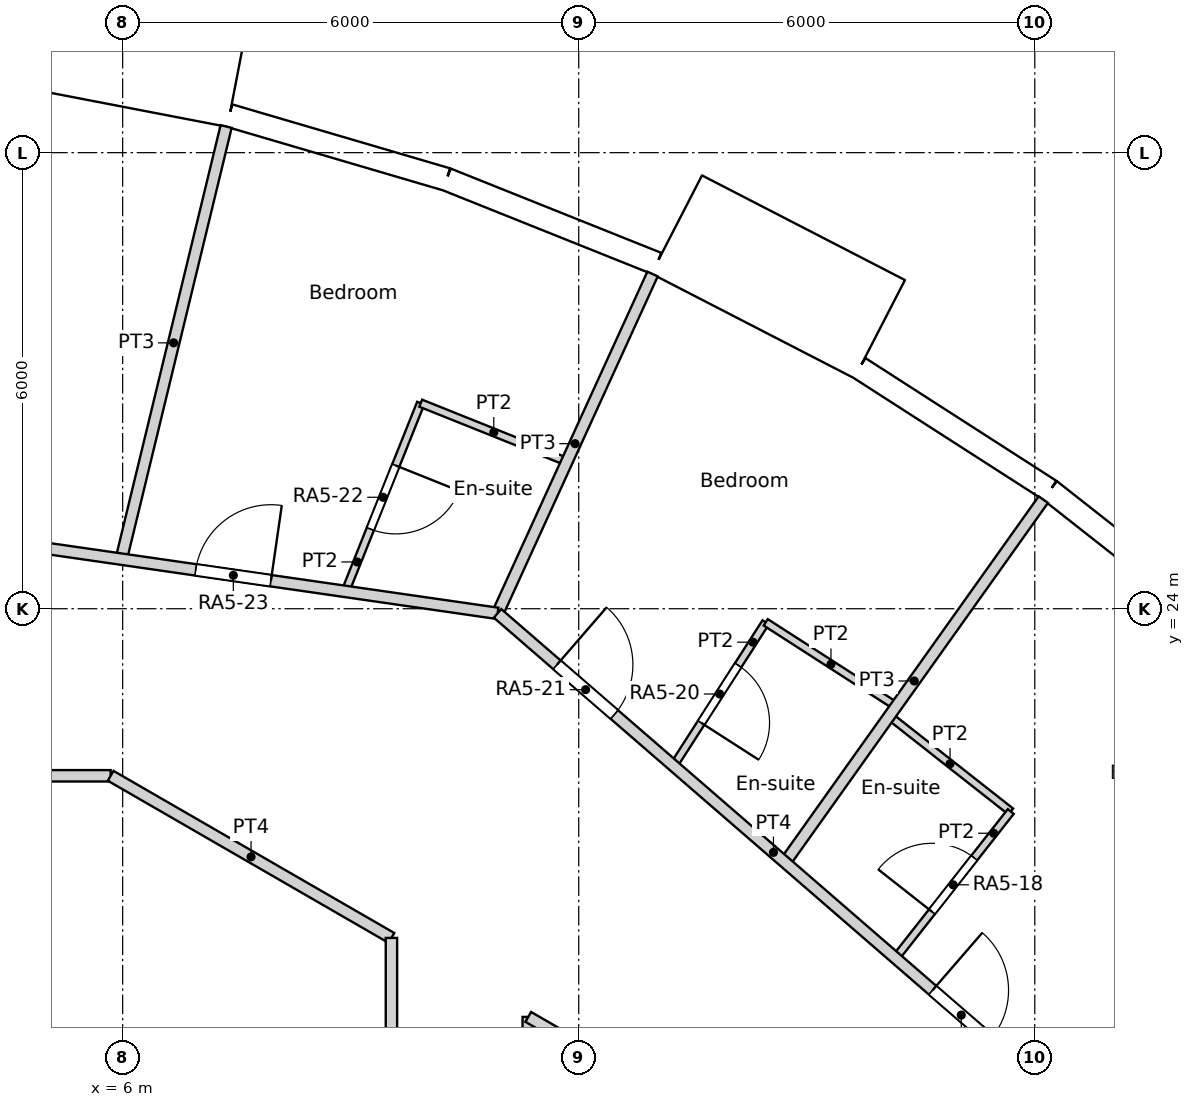
"""IFC4 building model, lengths in metres.
Left out: names, types, materials, properties, quantities, classifications, styles, units other than length and angle.
Written with IfcOpenShell. Run it as: python <this file> out.ifc"""

import sys

from ifc_helpers import new_model, si_unit, direction, frame, frame_2d, origin, origin_2d, place, context, subcontext, project, spatial, rectangle, circle, extrude, element, fill, save


model = new_model("IFC4")
c1 = context("Model", 3, precision=1e-05, world=origin(), true_north=direction((0.0, 1.0)))
c2 = subcontext(c1, "Body", "Model", "MODEL_VIEW")
j1 = project(units=[si_unit("LENGTHUNIT", "METRE"), si_unit("PLANEANGLEUNIT", "RADIAN")], contexts=[c1])
p1 = place(None, origin())
s1 = spatial("IfcSite", under=j1, at=p1, CompositionType="ELEMENT")
p2 = place(p1, origin())
s2 = spatial("IfcBuilding", under=s1, at=p2, CompositionType="ELEMENT")
p3 = place(p2, frame((0.0, 0.0, 71.4)))
s3 = spatial("IfcBuildingStorey", under=s2, at=p3, CompositionType="ELEMENT", Elevation=71.4)
for number, where, z_axis, x_axis in (
    (1, (17.561, 24.661, 0.0), (0.0, 0.0, 1.0), (1.0, 0.0, 0.0)),
    (2, (12.576, 27.539, 0.0), (0.0, 0.0, 1.0), (1.0, 0.0, 0.0)),
    (3, (7.137, 29.421, 0.0), (0.0, 0.0, 1.0), (1.0, 0.0, 0.0)),
):
    element("IfcColumn", number, at=place(p3, frame(where, z_axis=z_axis, x_axis=x_axis)), inside=s3, PredefinedType="COLUMN", context=c2, shape_type="SweptSolid", body=[
        extrude(circle(Radius=0.6, at=origin_2d()), origin(), (0.0, 0.0, 1.0), 3.6),
    ])
for number, where, z_axis, x_axis in (
    (4, (14.659, 19.69, 0.0), (0.0, 0.0, 1.0), (1.0, 0.0, 0.0)),
    (5, (9.723, 22.54, 0.0), (0.0, 0.0, 1.0), (1.0, 0.0, 0.0)),
):
    element("IfcColumn", number, at=place(p3, frame(where, z_axis=z_axis, x_axis=x_axis)), inside=s3, PredefinedType="COLUMN", context=c2, shape_type="SweptSolid", body=[
        extrude(circle(Radius=0.65, at=origin_2d()), origin(), (0.0, 0.0, 1.0), 3.6),
    ])
p4 = place(p3, frame((20.541, 23.715, 0.0), z_axis=(0.0, 0.0, 1.0), x_axis=(-0.786053834673, 0.618158045322, 0.0)))
e6 = element("IfcWall", 6, at=p4, inside=s3, PredefinedType="SOLIDWALL", context=c2, shape_type="SweptSolid", body=[
    extrude(rectangle(XDim=2.979, YDim=0.3, at=frame_2d((1.49, 0.0))), origin(), (0.0, 0.0, 1.0), 3.15),
])
p5 = place(p4, frame((1.49, 0.0, 1.55)))
e7 = element("IfcOpeningElement", 7, at=p5, cuts=e6, PredefinedType="OPENING", context=c2, shape_type="SweptSolid", body=[
    extrude(circle(Radius=0.9, at=origin_2d()), frame((0.0, 0.16, 0.0), z_axis=(0.0, -1.0, 0.0), x_axis=(1.0, 0.0, 0.0)), (0.0, 0.0, 1.0), 0.32),
])
p6 = place(p3, frame((18.199, 25.557, 0.0), z_axis=(0.0, 0.0, 1.0), x_axis=(-0.841260995538, 0.54062920508, 0.0)))
e8 = element("IfcWall", 8, at=p6, inside=s3, PredefinedType="SOLIDWALL", context=c2, shape_type="SweptSolid", body=[
    extrude(rectangle(XDim=2.979, YDim=0.3, at=frame_2d((1.49, 0.0))), origin(), (0.0, 0.0, 1.0), 3.15),
])
p7 = place(p6, frame((1.49, 0.0, 1.55)))
e9 = element("IfcOpeningElement", 9, at=p7, cuts=e8, PredefinedType="OPENING", context=c2, shape_type="SweptSolid", body=[
    extrude(circle(Radius=0.9, at=origin_2d()), frame((0.0, 0.16, 0.0), z_axis=(0.0, -1.0, 0.0), x_axis=(1.0, 0.0, 0.0)), (0.0, 0.0, 1.0), 0.32),
])
p8 = place(p3, frame((15.957, 27.679, -0.45), z_axis=(0.0, 0.0, 1.0), x_axis=(-0.888858064689, 0.458182650083, 0.0)))
e10 = element("IfcWall", 10, at=p8, inside=s3, PredefinedType="ELEMENTEDWALL", context=c2, shape_type="SweptSolid", body=[
    extrude(rectangle(XDim=3.0, YDim=1.45, at=frame_2d((1.5, 0.0))), origin(), (0.0, 0.0, 1.0), 3.6),
])
p9 = place(p8, frame((1.5, 0.0, 2.0)))
e11 = element("IfcOpeningElement", 11, at=p9, cuts=e10, PredefinedType="OPENING", context=c2, shape_type="SweptSolid", body=[
    extrude(circle(Radius=0.9, at=origin_2d()), frame((0.0, 0.735, 0.0), z_axis=(0.0, -1.0, 0.0), x_axis=(1.0, 0.0, 0.0)), (0.0, 0.0, 1.0), 1.47),
])
p10 = place(p3, frame((13.028, 28.542, 0.0), z_axis=(0.0, 0.0, 1.0), x_axis=(-0.928374947, 0.371644935098, 0.0)))
e12 = element("IfcWall", 12, at=p10, inside=s3, PredefinedType="SOLIDWALL", context=c2, shape_type="SweptSolid", body=[
    extrude(rectangle(XDim=2.98, YDim=0.3, at=frame_2d((1.49, 0.0))), origin(), (0.0, 0.0, 1.0), 3.15),
])
p11 = place(p10, frame((1.49, 0.0, 1.55)))
e13 = element("IfcOpeningElement", 13, at=p11, cuts=e12, PredefinedType="OPENING", context=c2, shape_type="SweptSolid", body=[
    extrude(circle(Radius=0.9, at=origin_2d()), frame((0.0, 0.16, 0.0), z_axis=(0.0, -1.0, 0.0), x_axis=(1.0, 0.0, 0.0)), (0.0, 0.0, 1.0), 0.32),
])
p12 = place(p3, frame((10.261, 29.649, 0.0), z_axis=(0.0, 0.0, 1.0), x_axis=(-0.959501085144, 0.281704930036, 0.0)))
e14 = element("IfcWall", 14, at=p12, inside=s3, PredefinedType="SOLIDWALL", context=c2, shape_type="SweptSolid", body=[
    extrude(rectangle(XDim=2.979, YDim=0.3, at=frame_2d((1.49, 0.0))), origin(), (0.0, 0.0, 1.0), 3.15),
])
p13 = place(p12, frame((1.49, 0.0, 1.55)))
e15 = element("IfcOpeningElement", 15, at=p13, cuts=e14, PredefinedType="OPENING", context=c2, shape_type="SweptSolid", body=[
    extrude(circle(Radius=0.9, at=origin_2d()), frame((0.0, 0.16, 0.0), z_axis=(0.0, -1.0, 0.0), x_axis=(1.0, 0.0, 0.0)), (0.0, 0.0, 1.0), 0.32),
])
p14 = place(p3, frame((7.513, 31.053, -0.45), z_axis=(0.0, 0.0, 1.0), x_axis=(-0.981921602273, 0.189288052949, 0.0)))
e16 = element("IfcWall", 16, at=p14, inside=s3, PredefinedType="ELEMENTEDWALL", context=c2, shape_type="SweptSolid", body=[
    extrude(rectangle(XDim=3.0, YDim=1.45, at=frame_2d((1.5, 0.0))), origin(), (0.0, 0.0, 1.0), 3.6),
])
p15 = place(p14, frame((1.5, 0.0, 2.0)))
e17 = element("IfcOpeningElement", 17, at=p15, cuts=e16, PredefinedType="OPENING", context=c2, shape_type="SweptSolid", body=[
    extrude(circle(Radius=0.9, at=origin_2d()), frame((0.0, 0.735, 0.0), z_axis=(0.0, -1.0, 0.0), x_axis=(1.0, 0.0, 0.0)), (0.0, 0.0, 1.0), 1.47),
])
p16 = place(p3, frame((10.932, 23.939, 0.0), z_axis=(0.0, 0.0, 1.0), x_axis=(0.755838982892, -0.654757536757, 0.0)))
e18 = element("IfcWall", 18, at=p16, inside=s3, PredefinedType="PARTITIONING", context=c2, shape_type="SweptSolid", body=[
    extrude(rectangle(XDim=14.83, YDim=0.15, at=frame_2d((7.415, 0.0))), origin(), (0.0, 0.0, 1.0), 3.15),
])
p17 = place(p16, frame((12.796, 0.0, 0.0)))
e19 = element("IfcOpeningElement", 19, at=p17, cuts=e18, PredefinedType="OPENING", context=c2, shape_type="SweptSolid", body=[
    extrude(rectangle(XDim=1.0, YDim=2.1, at=frame_2d((0.5, 1.05))), frame((0.0, 0.075, 0.0), z_axis=(0.0, -1.0, 0.0), x_axis=(1.0, 0.0, 0.0)), (0.0, 0.0, 1.0), 0.15),
])
p18 = place(p16, frame((7.572, 0.0, 0.0)))
e20 = element("IfcOpeningElement", 20, at=p18, cuts=e18, PredefinedType="OPENING", context=c2, shape_type="SweptSolid", body=[
    extrude(rectangle(XDim=1.0, YDim=2.1, at=frame_2d((0.5, 1.05))), frame((0.0, 0.075, 0.0), z_axis=(0.0, -1.0, 0.0), x_axis=(1.0, 0.0, 0.0)), (0.0, 0.0, 1.0), 0.15),
])
p19 = place(p16, frame((1.033, 0.0, 0.0)))
e21 = element("IfcOpeningElement", 21, at=p19, cuts=e18, PredefinedType="OPENING", context=c2, shape_type="SweptSolid", body=[
    extrude(rectangle(XDim=1.0, YDim=2.1, at=frame_2d((0.5, 1.05))), frame((0.0, 0.075, 0.0), z_axis=(0.0, -1.0, 0.0), x_axis=(1.0, 0.0, 0.0)), (0.0, 0.0, 1.0), 0.15),
])
p20 = place(p3, frame((9.536, 11.8, 0.0), z_axis=(0.0, 0.0, 1.0), x_axis=(0.0, 1.0, 0.0)))
e22 = element("IfcWall", 22, at=p20, inside=s3, PredefinedType="PARTITIONING", context=c2, shape_type="SweptSolid", body=[
    extrude(rectangle(XDim=7.869, YDim=0.15, at=frame_2d((3.935, 0.0))), origin(), (0.0, 0.0, 1.0), 3.15),
])
p21 = place(p3, frame((5.842, 21.802, 0.0), z_axis=(0.0, 0.0, 1.0), x_axis=(0.865983505205, -0.500072563448, 0.0)))
e23 = element("IfcWall", 23, at=p21, inside=s3, PredefinedType="PARTITIONING", context=c2, shape_type="SweptSolid", body=[
    extrude(rectangle(XDim=4.265, YDim=0.15, at=frame_2d((2.133, 0.0))), origin(), (0.0, 0.0, 1.0), 3.15),
])
p22 = place(p3, frame((0.608, 21.802, 0.0), z_axis=(0.0, 0.0, 1.0), x_axis=(1.0, 0.0, 0.0)))
e24 = element("IfcWall", 24, at=p22, inside=s3, PredefinedType="PARTITIONING", context=c2, shape_type="SweptSolid", body=[
    extrude(rectangle(XDim=5.234, YDim=0.15, at=frame_2d((2.617, 0.0))), origin(), (0.0, 0.0, 1.0), 3.15),
])
p23 = place(p3, frame((11.336, 18.63, 0.0), z_axis=(0.0, 0.0, 1.0), x_axis=(0.866056911224, -0.499945423543, 0.0)))
e25 = element("IfcWall", 25, at=p23, inside=s3, PredefinedType="PARTITIONING", context=c2, shape_type="SweptSolid", body=[
    extrude(rectangle(XDim=5.339, YDim=0.15, at=frame_2d((2.67, 0.0))), origin(), (0.0, 0.0, 1.0), 3.15),
])
p24 = place(p3, frame((11.336, 11.8, 0.0), z_axis=(0.0, 0.0, 1.0), x_axis=(0.0, 1.0, 0.0)))
e26 = element("IfcWall", 26, at=p24, inside=s3, PredefinedType="PARTITIONING", context=c2, shape_type="SweptSolid", body=[
    extrude(rectangle(XDim=6.83, YDim=0.15, at=frame_2d((3.415, 0.0))), origin(), (0.0, 0.0, 1.0), 3.15),
])
p25 = place(p24, frame((4.24, 0.0, 0.0)))
e27 = element("IfcOpeningElement", 27, at=p25, cuts=e26, PredefinedType="OPENING", context=c2, shape_type="SweptSolid", body=[
    extrude(rectangle(XDim=0.95, YDim=2.1, at=frame_2d((0.475, 1.05))), frame((0.0, 0.075, 0.0), z_axis=(0.0, -1.0, 0.0), x_axis=(1.0, 0.0, 0.0)), (0.0, 0.0, 1.0), 0.15),
])
p26 = place(p3, frame((-3.746, 26.054, 0.0), z_axis=(0.0, 0.0, 1.0), x_axis=(0.989780545379, -0.142598990138, 0.0)))
e28 = element("IfcWall", 28, at=p26, inside=s3, PredefinedType="PARTITIONING", context=c2, shape_type="SweptSolid", body=[
    extrude(rectangle(XDim=14.83, YDim=0.15, at=frame_2d((7.415, 0.0))), origin(), (0.0, 0.0, 1.0), 3.15),
])
p27 = place(p26, frame((10.817, 0.0, 0.0)))
e29 = element("IfcOpeningElement", 29, at=p27, cuts=e28, PredefinedType="OPENING", context=c2, shape_type="SweptSolid", body=[
    extrude(rectangle(XDim=1.0, YDim=2.1, at=frame_2d((0.5, 1.05))), frame((0.0, 0.075, 0.0), z_axis=(0.0, -1.0, 0.0), x_axis=(1.0, 0.0, 0.0)), (0.0, 0.0, 1.0), 0.15),
])
p28 = place(p26, frame((4.016, 0.0, 0.0)))
e30 = element("IfcOpeningElement", 30, at=p28, cuts=e28, PredefinedType="OPENING", context=c2, shape_type="SweptSolid", body=[
    extrude(rectangle(XDim=1.8, YDim=2.1, at=frame_2d((0.9, 1.05))), frame((0.0, 0.075, 0.0), z_axis=(0.0, -1.0, 0.0), x_axis=(1.0, 0.0, 0.0)), (0.0, 0.0, 1.0), 0.15),
])
p29 = place(p3, frame((18.36, 17.505, 0.0), z_axis=(0.0, 0.0, 1.0), x_axis=(0.723686703731, 0.690128650937, 0.0)))
e31 = element("IfcWall", 31, at=p29, inside=s3, PredefinedType="PARTITIONING", context=c2, shape_type="SweptSolid", body=[
    extrude(rectangle(XDim=5.856, YDim=0.15, at=frame_2d((2.928, 0.0))), origin(), (0.0, 0.0, 1.0), 3.15),
])
p30 = place(p3, frame((16.168, 19.404, 0.0), z_axis=(0.0, 0.0, 1.0), x_axis=(0.618142414415, 0.786066126672, 0.0)))
e32 = element("IfcWall", 32, at=p30, inside=s3, PredefinedType="PARTITIONING", context=c2, shape_type="SweptSolid", body=[
    extrude(rectangle(XDim=2.453, YDim=0.1, at=frame_2d((1.226, 0.0))), origin(), (0.0, 0.0, 1.0), 3.15),
])
p31 = place(p30, frame((0.776, 0.0, 0.0)))
e33 = element("IfcOpeningElement", 33, at=p31, cuts=e32, PredefinedType="OPENING", context=c2, shape_type="SweptSolid", body=[
    extrude(rectangle(XDim=0.9, YDim=2.04, at=frame_2d((0.45, 1.02))), frame((0.0, 0.05, 0.0), z_axis=(0.0, -1.0, 0.0), x_axis=(1.0, 0.0, 0.0)), (0.0, 0.0, 1.0), 0.1),
])
p32 = place(p3, frame((16.086, 22.589, 0.0), z_axis=(0.0, 0.0, 1.0), x_axis=(0.785984904201, -0.618245687707, 0.0)))
e34 = element("IfcWall", 34, at=p32, inside=s3, PredefinedType="PARTITIONING", context=c2, shape_type="SweptSolid", body=[
    extrude(rectangle(XDim=2.033, YDim=0.1, at=frame_2d((1.017, 0.0))), origin(), (0.0, 0.0, 1.0), 3.15),
])
p33 = place(p3, frame((14.715, 20.664, 0.0), z_axis=(0.0, 0.0, 1.0), x_axis=(0.57995989616, 0.814645026282, 0.0)))
e35 = element("IfcWall", 35, at=p33, inside=s3, PredefinedType="PARTITIONING", context=c2, shape_type="SweptSolid", body=[
    extrude(rectangle(XDim=5.857, YDim=0.15, at=frame_2d((2.928, 0.0))), origin(), (0.0, 0.0, 1.0), 3.15),
])
p34 = place(p3, frame((14.46, 23.821, 0.0), z_axis=(0.0, 0.0, 1.0), x_axis=(0.841135728185, -0.540824081168, 0.0)))
e36 = element("IfcWall", 36, at=p34, inside=s3, PredefinedType="PARTITIONING", context=c2, shape_type="SweptSolid", body=[
    extrude(rectangle(XDim=2.041, YDim=0.1, at=frame_2d((1.021, 0.0))), origin(), (0.0, 0.0, 1.0), 3.15),
])
p35 = place(p3, frame((13.248, 21.935, 0.0), z_axis=(0.0, 0.0, 1.0), x_axis=(0.540597960994, 0.841281073464, 0.0)))
e37 = element("IfcWall", 37, at=p35, inside=s3, PredefinedType="PARTITIONING", context=c2, shape_type="SweptSolid", body=[
    extrude(rectangle(XDim=2.242, YDim=0.1, at=frame_2d((1.121, 0.0))), origin(), (0.0, 0.0, 1.0), 3.15),
])
p36 = place(p35, frame((0.671, 0.0, 0.0)))
e38 = element("IfcOpeningElement", 38, at=p36, cuts=e37, PredefinedType="OPENING", context=c2, shape_type="SweptSolid", body=[
    extrude(rectangle(XDim=0.9, YDim=2.04, at=frame_2d((0.45, 1.02))), frame((0.0, 0.05, 0.0), z_axis=(0.0, -1.0, 0.0), x_axis=(1.0, 0.0, 0.0)), (0.0, 0.0, 1.0), 0.1),
])
p37 = place(p3, frame((10.933, 23.94, 0.0), z_axis=(0.0, 0.0, 1.0), x_axis=(0.415286978667, 0.909690455787, 0.0)))
e39 = element("IfcWall", 39, at=p37, inside=s3, PredefinedType="PARTITIONING", context=c2, shape_type="SweptSolid", body=[
    extrude(rectangle(XDim=4.906, YDim=0.15, at=frame_2d((2.453, 0.0))), origin(), (0.0, 0.0, 1.0), 3.15),
])
p38 = place(p3, frame((9.921, 26.704, 0.0), z_axis=(0.0, 0.0, 1.0), x_axis=(0.928346586681, -0.37171577179, 0.0)))
e40 = element("IfcWall", 40, at=p38, inside=s3, PredefinedType="PARTITIONING", context=c2, shape_type="SweptSolid", body=[
    extrude(rectangle(XDim=2.072, YDim=0.1, at=frame_2d((1.036, 0.0))), origin(), (0.0, 0.0, 1.0), 3.15),
])
p39 = place(p3, frame((8.93, 24.228, 0.0), z_axis=(0.0, 0.0, 1.0), x_axis=(0.371564281805, 0.928407229876, 0.0)))
e41 = element("IfcWall", 41, at=p39, inside=s3, PredefinedType="PARTITIONING", context=c2, shape_type="SweptSolid", body=[
    extrude(rectangle(XDim=2.667, YDim=0.1, at=frame_2d((1.333, 0.0))), origin(), (0.0, 0.0, 1.0), 3.15),
])
p40 = place(p39, frame((0.884, 0.0, 0.0)))
e42 = element("IfcOpeningElement", 42, at=p40, cuts=e41, PredefinedType="OPENING", context=c2, shape_type="SweptSolid", body=[
    extrude(rectangle(XDim=0.9, YDim=2.04, at=frame_2d((0.45, 1.02))), frame((0.0, 0.05, 0.0), z_axis=(0.0, -1.0, 0.0), x_axis=(1.0, 0.0, 0.0)), (0.0, 0.0, 1.0), 0.1),
])
p41 = place(p3, frame((5.981, 24.652, 0.0), z_axis=(0.0, 0.0, 1.0), x_axis=(0.235644168604, 0.971839403298, 0.0)))
e43 = element("IfcWall", 43, at=p41, inside=s3, PredefinedType="PARTITIONING", context=c2, shape_type="SweptSolid", body=[
    extrude(rectangle(XDim=5.857, YDim=0.15, at=frame_2d((2.928, 0.0))), origin(), (0.0, 0.0, 1.0), 3.15),
])
p42 = place(p5, origin())
e44 = element("IfcWindow", 44, at=p42, inside=s3, PartitioningType="SINGLE_PANEL", PredefinedType="WINDOW", context=c2, shape_type="SweptSolid", body=[
    extrude(circle(Radius=0.9, at=origin_2d()), frame((0.0, 0.12, 0.0), z_axis=(0.0, -1.0, 0.0), x_axis=(1.0, 0.0, 0.0)), (0.0, 0.0, 1.0), 0.1),
])
fill(e7, e44)
p43 = place(p7, origin())
e45 = element("IfcWindow", 45, at=p43, inside=s3, PartitioningType="SINGLE_PANEL", PredefinedType="WINDOW", context=c2, shape_type="SweptSolid", body=[
    extrude(circle(Radius=0.9, at=origin_2d()), frame((0.0, 0.12, 0.0), z_axis=(0.0, -1.0, 0.0), x_axis=(1.0, 0.0, 0.0)), (0.0, 0.0, 1.0), 0.1),
])
fill(e9, e45)
p44 = place(p9, origin())
e46 = element("IfcWindow", 46, at=p44, inside=s3, PartitioningType="SINGLE_PANEL", PredefinedType="WINDOW", context=c2, shape_type="SweptSolid", body=[
    extrude(circle(Radius=0.9, at=origin_2d()), frame((0.0, 0.695, 0.0), z_axis=(0.0, -1.0, 0.0), x_axis=(1.0, 0.0, 0.0)), (0.0, 0.0, 1.0), 0.1),
])
fill(e11, e46)
p45 = place(p11, origin())
e47 = element("IfcWindow", 47, at=p45, inside=s3, PartitioningType="SINGLE_PANEL", PredefinedType="WINDOW", context=c2, shape_type="SweptSolid", body=[
    extrude(circle(Radius=0.9, at=origin_2d()), frame((0.0, 0.12, 0.0), z_axis=(0.0, -1.0, 0.0), x_axis=(1.0, 0.0, 0.0)), (0.0, 0.0, 1.0), 0.1),
])
fill(e13, e47)
p46 = place(p13, origin())
e48 = element("IfcWindow", 48, at=p46, inside=s3, PartitioningType="SINGLE_PANEL", PredefinedType="WINDOW", context=c2, shape_type="SweptSolid", body=[
    extrude(circle(Radius=0.9, at=origin_2d()), frame((0.0, 0.12, 0.0), z_axis=(0.0, -1.0, 0.0), x_axis=(1.0, 0.0, 0.0)), (0.0, 0.0, 1.0), 0.1),
])
fill(e15, e48)
p47 = place(p15, origin())
e49 = element("IfcWindow", 49, at=p47, inside=s3, PartitioningType="SINGLE_PANEL", PredefinedType="WINDOW", context=c2, shape_type="SweptSolid", body=[
    extrude(circle(Radius=0.9, at=origin_2d()), frame((0.0, 0.695, 0.0), z_axis=(0.0, -1.0, 0.0), x_axis=(1.0, 0.0, 0.0)), (0.0, 0.0, 1.0), 0.1),
])
fill(e17, e49)
p48 = place(p31, origin())
e50 = element("IfcDoor", 50, at=p48, inside=s3, OperationType="SINGLE_SWING_LEFT", PredefinedType="DOOR", context=c2, shape_type="SweptSolid", body=[
    extrude(rectangle(XDim=0.9, YDim=2.04, at=frame_2d((0.45, 1.02))), frame((0.0, 0.025, 0.0), z_axis=(0.0, -1.0, 0.0), x_axis=(1.0, 0.0, 0.0)), (0.0, 0.0, 1.0), 0.05),
])
fill(e33, e50)
p49 = place(p18, origin())
e51 = element("IfcDoor", 51, at=p49, inside=s3, OperationType="SINGLE_SWING_LEFT", PredefinedType="DOOR", context=c2, shape_type="SweptSolid", body=[
    extrude(rectangle(XDim=1.0, YDim=2.1, at=frame_2d((0.5, 1.05))), frame((0.0, 0.025, 0.0), z_axis=(0.0, -1.0, 0.0), x_axis=(1.0, 0.0, 0.0)), (0.0, 0.0, 1.0), 0.05),
])
fill(e20, e51)
p50 = place(p36, origin())
e52 = element("IfcDoor", 52, at=p50, inside=s3, OperationType="SINGLE_SWING_RIGHT", PredefinedType="DOOR", context=c2, shape_type="SweptSolid", body=[
    extrude(rectangle(XDim=0.9, YDim=2.04, at=frame_2d((0.45, 1.02))), frame((0.0, 0.025, 0.0), z_axis=(0.0, -1.0, 0.0), x_axis=(1.0, 0.0, 0.0)), (0.0, 0.0, 1.0), 0.05),
])
fill(e38, e52)
p51 = place(p19, origin())
e53 = element("IfcDoor", 53, at=p51, inside=s3, OperationType="SINGLE_SWING_LEFT", PredefinedType="DOOR", context=c2, shape_type="SweptSolid", body=[
    extrude(rectangle(XDim=1.0, YDim=2.1, at=frame_2d((0.5, 1.05))), frame((0.0, 0.025, 0.0), z_axis=(0.0, -1.0, 0.0), x_axis=(1.0, 0.0, 0.0)), (0.0, 0.0, 1.0), 0.05),
])
fill(e21, e53)
p52 = place(p40, origin())
e54 = element("IfcDoor", 54, at=p52, inside=s3, OperationType="SINGLE_SWING_LEFT", PredefinedType="DOOR", context=c2, shape_type="SweptSolid", body=[
    extrude(rectangle(XDim=0.9, YDim=2.04, at=frame_2d((0.45, 1.02))), frame((0.0, 0.025, 0.0), z_axis=(0.0, -1.0, 0.0), x_axis=(1.0, 0.0, 0.0)), (0.0, 0.0, 1.0), 0.05),
])
fill(e42, e54)
p53 = place(p27, origin())
e55 = element("IfcDoor", 55, at=p53, inside=s3, OperationType="SINGLE_SWING_RIGHT", PredefinedType="DOOR", context=c2, shape_type="SweptSolid", body=[
    extrude(rectangle(XDim=1.0, YDim=2.1, at=frame_2d((0.5, 1.05))), frame((0.0, 0.025, 0.0), z_axis=(0.0, -1.0, 0.0), x_axis=(1.0, 0.0, 0.0)), (0.0, 0.0, 1.0), 0.05),
])
fill(e29, e55)
save(model, sys.argv[1])
